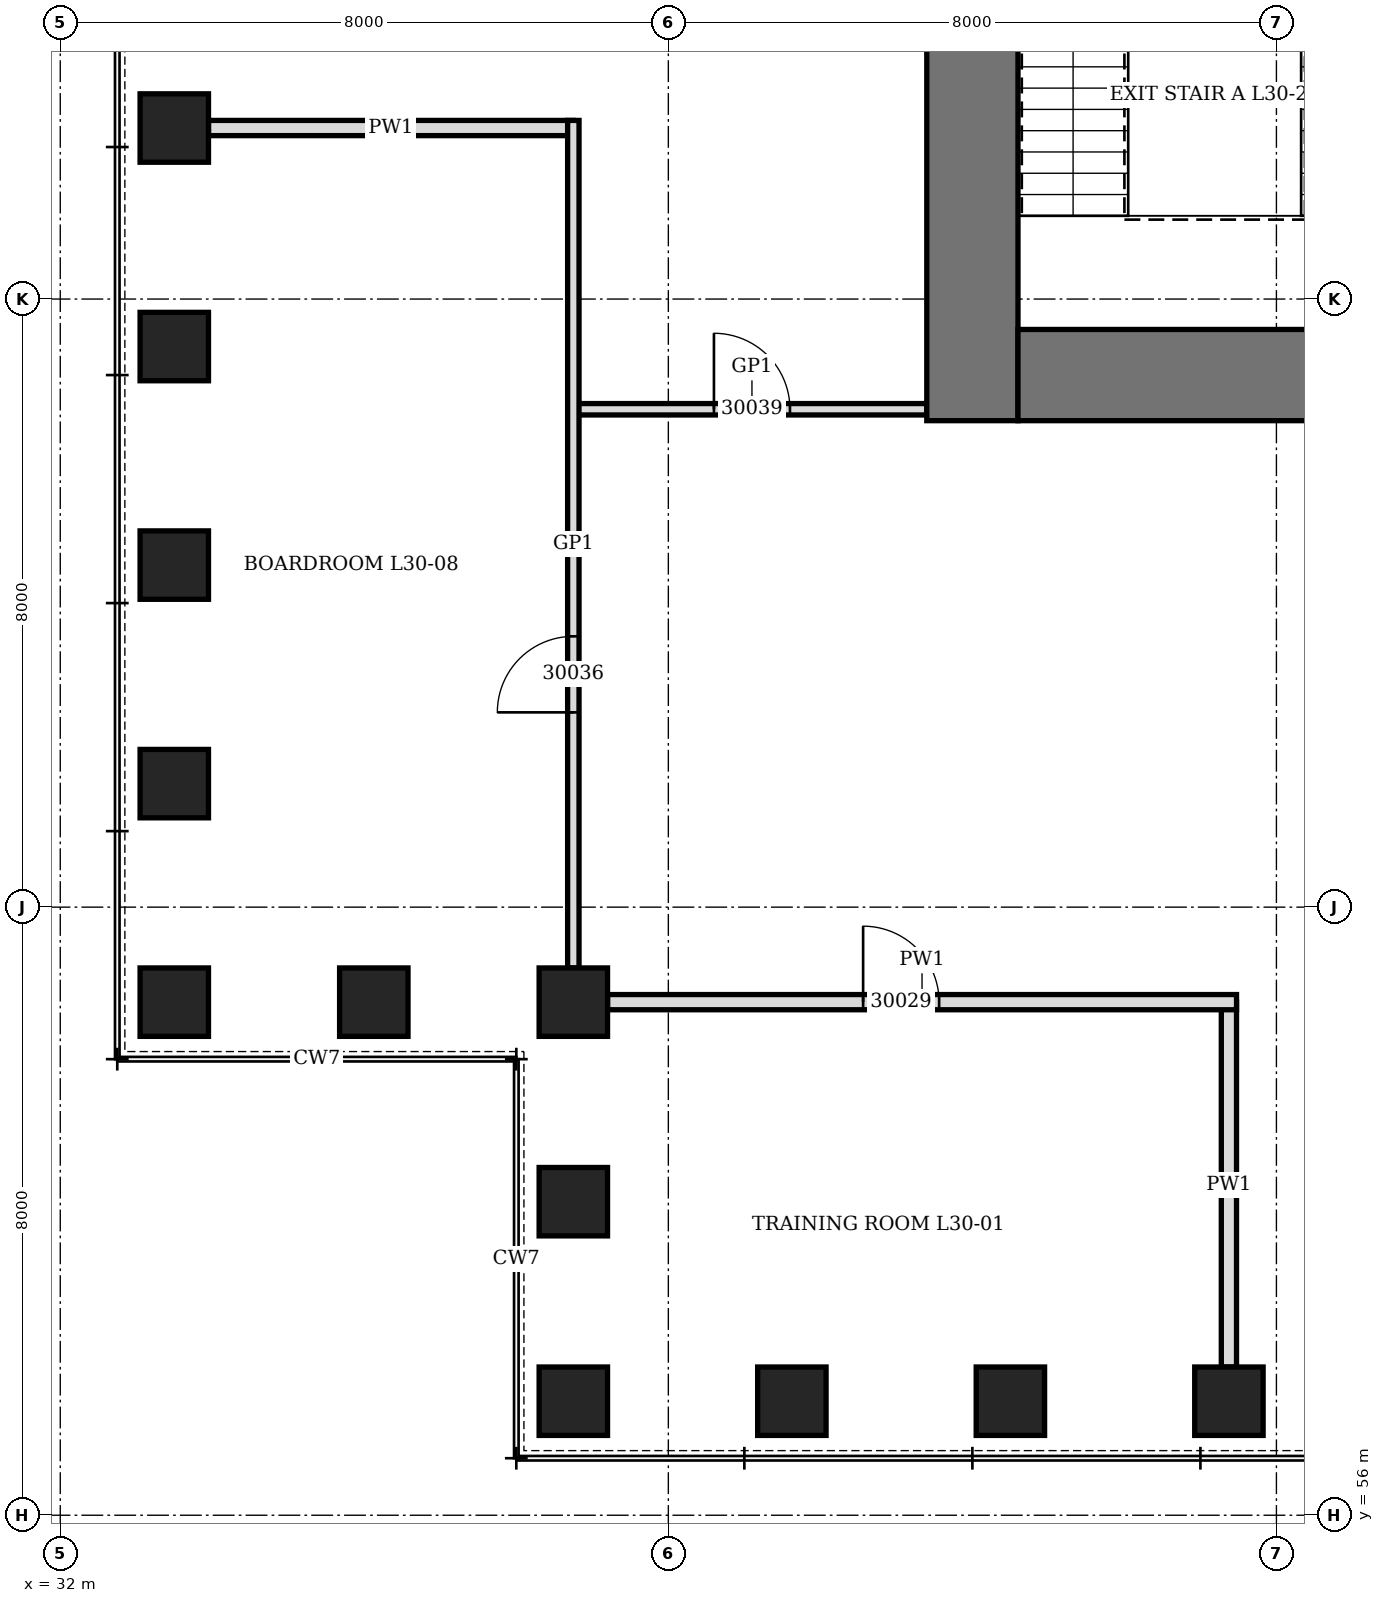
"""IFC4 building model, lengths in metres.
Left out: names, types, materials, properties, quantities, classifications, styles, units other than length and angle.
Written with IfcOpenShell. Run it as: python <this file> out.ifc"""

import sys

from ifc_helpers import new_model, si_unit, direction, frame, frame_2d, origin, origin_2d, place, context, subcontext, project, spatial, rectangle, hollow_rectangle, extrude, element, fill, save


model = new_model("IFC4")
c1 = context("Model", 3, precision=1e-05, world=origin(), true_north=direction((0.0, 1.0)))
c2 = subcontext(c1, "Body", "Model", "MODEL_VIEW")
j1 = project(units=[si_unit("LENGTHUNIT", "METRE"), si_unit("PLANEANGLEUNIT", "RADIAN")], contexts=[c1])
p1 = place(None, origin())
s1 = spatial("IfcSite", under=j1, at=p1, CompositionType="ELEMENT")
p2 = place(p1, origin())
s2 = spatial("IfcBuilding", under=s1, at=p2, CompositionType="ELEMENT")
p3 = place(p2, frame((0.0, 0.0, 137.5)))
s3 = spatial("IfcBuildingStorey", under=s2, at=p3, CompositionType="ELEMENT", Elevation=137.5)
for number, where, z_axis, x_axis in (
    (1, (38.75, 57.5, 0.0), (0.0, 0.0, 1.0), (1.0, 0.0, 0.0)),
    (2, (41.625, 57.5, 0.0), (0.0, 0.0, 1.0), (1.0, 0.0, 0.0)),
    (3, (44.5, 57.5, 0.0), (0.0, 0.0, 1.0), (1.0, 0.0, 0.0)),
    (4, (47.375, 57.5, 0.0), (0.0, 0.0, 1.0), (1.0, 0.0, 0.0)),
    (5, (33.5, 74.25, 0.0), (0.0, 0.0, 1.0), (0.0, 1.0, 0.0)),
    (6, (33.5, 71.375, 0.0), (0.0, 0.0, 1.0), (0.0, 1.0, 0.0)),
    (7, (33.5, 68.5, 0.0), (0.0, 0.0, 1.0), (0.0, 1.0, 0.0)),
    (8, (33.5, 65.625, 0.0), (0.0, 0.0, 1.0), (0.0, 1.0, 0.0)),
    (9, (33.5, 62.75, 0.0), (0.0, 0.0, 1.0), (1.0, 0.0, 0.0)),
    (10, (36.125, 62.75, 0.0), (0.0, 0.0, 1.0), (1.0, 0.0, 0.0)),
    (11, (38.75, 62.75, 0.0), (0.0, 0.0, 1.0), (0.0, 1.0, 0.0)),
    (12, (38.75, 60.125, 0.0), (0.0, 0.0, 1.0), (0.0, 1.0, 0.0)),
):
    element("IfcColumn", number, at=place(p3, frame(where, z_axis=z_axis, x_axis=x_axis)), inside=s3, PredefinedType="COLUMN", context=c2, shape_type="SweptSolid", body=[
        extrude(hollow_rectangle(XDim=0.9, YDim=0.9, WallThickness=0.15, at=origin_2d()), origin(), (0.0, 0.0, 1.0), 4.2),
    ])
p4 = place(p3, frame((44.0, 70.4, 0.0), z_axis=(0.0, 0.0, 1.0), x_axis=(0.0, 1.0, 0.0)))
e13 = element("IfcWall", 13, at=p4, inside=s3, PredefinedType="SHEAR", context=c2, shape_type="SweptSolid", body=[
    extrude(rectangle(XDim=19.2, YDim=1.2, at=frame_2d((9.6, 0.0))), origin(), (0.0, 0.0, 1.0), 4.2),
])
p5 = place(p4, frame((8.6, 0.0, 0.0)))
e14 = element("IfcOpeningElement", 14, at=p5, cuts=e13, PredefinedType="OPENING", context=c2, shape_type="SweptSolid", body=[
    extrude(rectangle(XDim=2.0, YDim=2.4, at=frame_2d((1.0, 1.2))), frame((0.0, 0.61, 0.0), z_axis=(0.0, -1.0, 0.0), x_axis=(1.0, 0.0, 0.0)), (0.0, 0.0, 1.0), 1.22),
])
p6 = place(p3, frame((44.6, 71.0, 0.0), z_axis=(0.0, 0.0, 1.0), x_axis=(1.0, 0.0, 0.0)))
e15 = element("IfcWall", 15, at=p6, inside=s3, PredefinedType="SHEAR", context=c2, shape_type="SweptSolid", body=[
    extrude(rectangle(XDim=22.8, YDim=1.2, at=frame_2d((11.4, 0.0))), origin(), (0.0, 0.0, 1.0), 4.2),
])
p7 = place(p3, frame((47.375, 57.95, 0.0), z_axis=(0.0, 0.0, 1.0), x_axis=(0.0, 1.0, 0.0)))
e16 = element("IfcWall", 16, at=p7, inside=s3, PredefinedType="PARTITIONING", context=c2, shape_type="SweptSolid", body=[
    extrude(rectangle(XDim=4.8, YDim=0.2, at=frame_2d((2.4, 0.0))), origin(), (0.0, 0.0, 1.0), 3.278),
])
p8 = place(p3, frame((33.95, 74.25, 0.0), z_axis=(0.0, 0.0, 1.0), x_axis=(1.0, 0.0, 0.0)))
e17 = element("IfcWall", 17, at=p8, inside=s3, PredefinedType="PARTITIONING", context=c2, shape_type="SweptSolid", body=[
    extrude(rectangle(XDim=4.8, YDim=0.2, at=frame_2d((2.4, 0.0))), origin(), (0.0, 0.0, 1.0), 3.428),
])
p9 = place(p3, frame((39.2, 62.75, 0.0), z_axis=(0.0, 0.0, 1.0), x_axis=(1.0, 0.0, 0.0)))
e18 = element("IfcWall", 18, at=p9, inside=s3, PredefinedType="PARTITIONING", context=c2, shape_type="SweptSolid", body=[
    extrude(rectangle(XDim=8.275, YDim=0.2, at=frame_2d((4.138, 0.0))), origin(), (0.0, 0.0, 1.0), 4.04),
])
p10 = place(p9, frame((3.363, 0.0, 0.0)))
e19 = element("IfcOpeningElement", 19, at=p10, cuts=e18, PredefinedType="OPENING", context=c2, shape_type="SweptSolid", body=[
    extrude(rectangle(XDim=1.0, YDim=2.1, at=frame_2d((0.5, 1.05))), frame((0.0, 0.11, 0.0), z_axis=(0.0, -1.0, 0.0), x_axis=(1.0, 0.0, 0.0)), (0.0, 0.0, 1.0), 0.22),
])
p11 = place(p3, frame((38.8, 70.55, 0.0), z_axis=(0.0, 0.0, 1.0), x_axis=(1.0, 0.0, 0.0)))
e20 = element("IfcWall", 20, at=p11, inside=s3, PredefinedType="PARTITIONING", context=c2, shape_type="SweptSolid", body=[
    extrude(rectangle(XDim=4.6, YDim=0.15, at=frame_2d((2.3, 0.0))), origin(), (0.0, 0.0, 1.0), 4.04),
])
p12 = place(p11, frame((1.8, 0.0, 0.0)))
e21 = element("IfcOpeningElement", 21, at=p12, cuts=e20, PredefinedType="OPENING", context=c2, shape_type="SweptSolid", body=[
    extrude(rectangle(XDim=1.0, YDim=2.4, at=frame_2d((0.5, 1.2))), frame((0.0, 0.085, 0.0), z_axis=(0.0, -1.0, 0.0), x_axis=(1.0, 0.0, 0.0)), (0.0, 0.0, 1.0), 0.17),
])
p13 = place(p3, frame((38.75, 63.2, 0.0), z_axis=(0.0, 0.0, 1.0), x_axis=(0.0, 1.0, 0.0)))
e22 = element("IfcWall", 22, at=p13, inside=s3, PredefinedType="PARTITIONING", context=c2, shape_type="SweptSolid", body=[
    extrude(rectangle(XDim=11.15, YDim=0.15, at=frame_2d((5.575, 0.0))), origin(), (0.0, 0.0, 1.0), 4.04),
])
p14 = place(p13, frame((3.363, 0.0, 0.0)))
e23 = element("IfcOpeningElement", 23, at=p14, cuts=e22, PredefinedType="OPENING", context=c2, shape_type="SweptSolid", body=[
    extrude(rectangle(XDim=1.0, YDim=2.4, at=frame_2d((0.5, 1.2))), frame((0.0, 0.085, 0.0), z_axis=(0.0, -1.0, 0.0), x_axis=(1.0, 0.0, 0.0)), (0.0, 0.0, 1.0), 0.17),
])
p15 = place(p10, origin())
e24 = element("IfcDoor", 24, at=p15, inside=s3, OperationType="SINGLE_SWING_LEFT", PredefinedType="DOOR", context=c2, shape_type="SweptSolid", body=[
    extrude(rectangle(XDim=1.0, YDim=2.1, at=frame_2d((0.5, 1.05))), frame((0.0, 0.1, 0.0), z_axis=(0.0, -1.0, 0.0), x_axis=(1.0, 0.0, 0.0)), (0.0, 0.0, 1.0), 0.199),
])
fill(e19, e24)
p16 = place(p14, origin())
e25 = element("IfcDoor", 25, at=p16, inside=s3, OperationType="SINGLE_SWING_RIGHT", PredefinedType="DOOR", context=c2, shape_type="SweptSolid", body=[
    extrude(rectangle(XDim=1.0, YDim=2.4, at=frame_2d((0.5, 1.2))), frame((0.0, 0.075, 0.0), z_axis=(0.0, -1.0, 0.0), x_axis=(1.0, 0.0, 0.0)), (0.0, 0.0, 1.0), 0.149),
])
fill(e23, e25)
p17 = place(p12, origin())
e26 = element("IfcDoor", 26, at=p17, inside=s3, OperationType="SINGLE_SWING_RIGHT", PredefinedType="DOOR", context=c2, shape_type="SweptSolid", body=[
    extrude(rectangle(XDim=1.0, YDim=2.4, at=frame_2d((0.5, 1.2))), frame((0.0, 0.075, 0.0), z_axis=(0.0, -1.0, 0.0), x_axis=(1.0, 0.0, 0.0)), (0.0, 0.0, 1.0), 0.149),
])
fill(e21, e26)
save(model, sys.argv[1])
